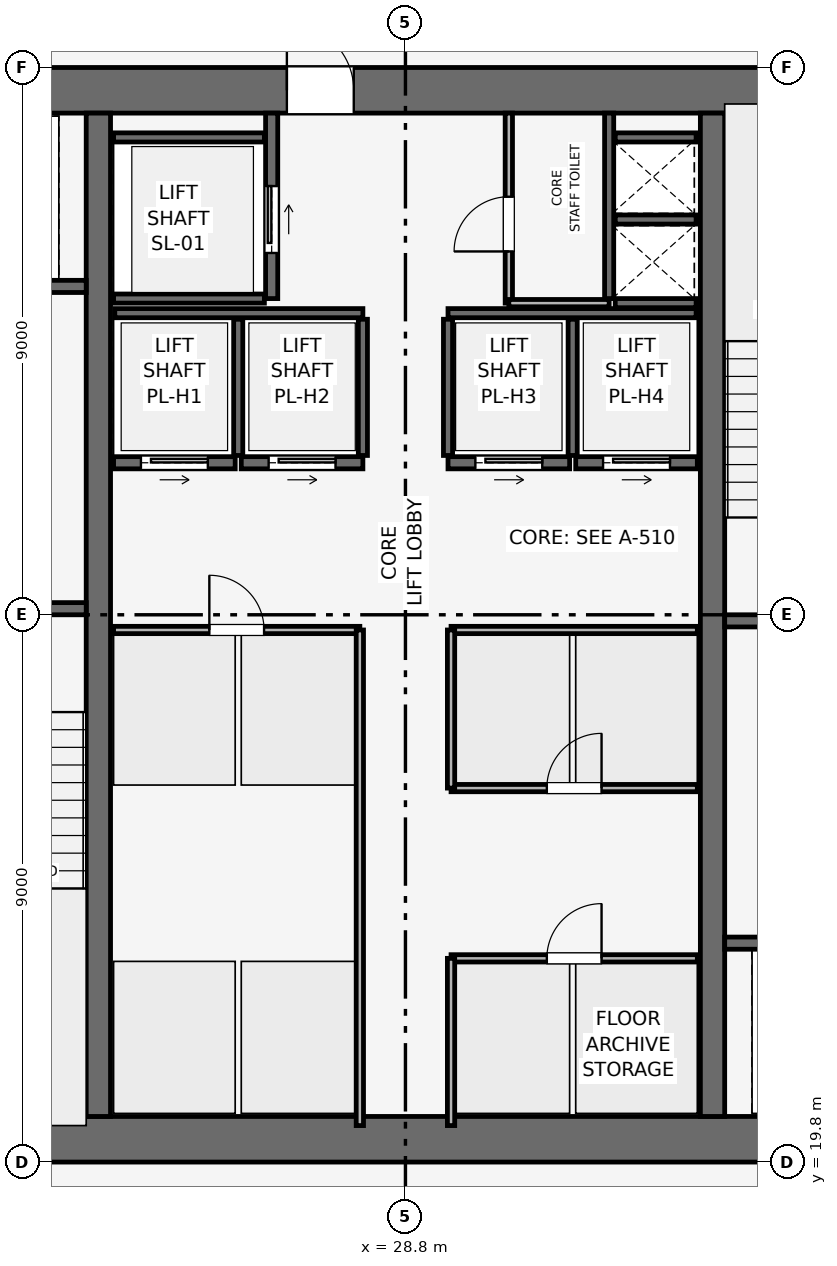
"""IFC4 building model, lengths in metres.
Left out: names, types, materials, properties, quantities, classifications, styles, units other than length and angle.
Written with IfcOpenShell. Run it as: python <this file> out.ifc"""

import sys

from ifc_helpers import new_model, si_unit, direction, frame, frame_2d, origin, place, context, subcontext, project, spatial, rectangle, extrude, element, fill, save


model = new_model("IFC4")
c1 = context("Model", 3, precision=1e-05, world=origin(), true_north=direction((0.0, 1.0)))
c2 = subcontext(c1, "Body", "Model", "MODEL_VIEW")
j1 = project(units=[si_unit("LENGTHUNIT", "METRE"), si_unit("PLANEANGLEUNIT", "RADIAN")], contexts=[c1])
p1 = place(None, origin())
s1 = spatial("IfcSite", under=j1, at=p1, CompositionType="ELEMENT")
p2 = place(p1, origin())
s2 = spatial("IfcBuilding", under=s1, at=p2, CompositionType="ELEMENT")
p3 = place(p2, frame((0.0, 0.0, 276.6)))
s3 = spatial("IfcBuildingStorey", under=s2, at=p3, CompositionType="ELEMENT", Elevation=276.6)
p4 = place(p3, frame((19.8, 20.175, 0.0), z_axis=(0.0, 0.0, 1.0), x_axis=(1.0, 0.0, 0.0)))
e1 = element("IfcWall", 1, at=p4, inside=s3, PredefinedType="SHEAR", context=c2, shape_type="SweptSolid", body=[
    extrude(rectangle(XDim=18.0, YDim=0.75, at=frame_2d((9.0, 0.0))), origin(), (0.0, 0.0, 1.0), 3.75),
])
p5 = place(p3, frame((19.8, 37.425, 0.0), z_axis=(0.0, 0.0, 1.0), x_axis=(1.0, 0.0, 0.0)))
e2 = element("IfcWall", 2, at=p5, inside=s3, PredefinedType="SHEAR", context=c2, shape_type="SweptSolid", body=[
    extrude(rectangle(XDim=18.0, YDim=0.75, at=frame_2d((9.0, 0.0))), origin(), (0.0, 0.0, 1.0), 3.75),
])
p6 = place(p5, frame((7.05, 0.0, 0.0)))
e3 = element("IfcOpeningElement", 3, at=p6, cuts=e2, PredefinedType="OPENING", context=c2, shape_type="SweptSolid", body=[
    extrude(rectangle(XDim=1.1, YDim=2.15, at=frame_2d((0.55, 1.075))), frame((0.0, 0.385, 0.0), z_axis=(0.0, -1.0, 0.0), x_axis=(1.0, 0.0, 0.0)), (0.0, 0.0, 1.0), 0.77),
])
for number, where, z_axis, x_axis in (
    (4, (23.75, 20.55, 0.0), (0.0, 0.0, 1.0), (0.0, 1.0, 0.0)),
    (5, (33.85, 20.55, 0.0), (0.0, 0.0, 1.0), (0.0, 1.0, 0.0)),
):
    element("IfcWall", number, at=place(p3, frame(where, z_axis=z_axis, x_axis=x_axis)), inside=s3, PredefinedType="SHEAR", context=c2, shape_type="SweptSolid", body=[
        extrude(rectangle(XDim=16.5, YDim=0.4, at=frame_2d((8.25, 0.0))), origin(), (0.0, 0.0, 1.0), 3.75),
    ])
p7 = place(p3, frame((20.4, 28.9, 0.0), z_axis=(0.0, 0.0, 1.0), x_axis=(1.0, 0.0, 0.0)))
e6 = element("IfcWall", 6, at=p7, inside=s3, PredefinedType="SHEAR", context=c2, shape_type="SweptSolid", body=[
    extrude(rectangle(XDim=3.15, YDim=0.2, at=frame_2d((1.575, 0.0))), origin(), (0.0, 0.0, 1.0), 3.5),
])
p8 = place(p7, frame((0.8, 0.0, 0.0)))
e7 = element("IfcOpeningElement", 7, at=p8, cuts=e6, PredefinedType="OPENING", context=c2, shape_type="SweptSolid", body=[
    extrude(rectangle(XDim=1.0, YDim=2.1, at=frame_2d((0.5, 1.05))), frame((0.0, 0.11, 0.0), z_axis=(0.0, -1.0, 0.0), x_axis=(1.0, 0.0, 0.0)), (0.0, 0.0, 1.0), 0.22),
])
p9 = place(p3, frame((34.05, 28.7, 0.0), z_axis=(0.0, 0.0, 1.0), x_axis=(1.0, 0.0, 0.0)))
e8 = element("IfcWall", 8, at=p9, inside=s3, PredefinedType="SHEAR", context=c2, shape_type="SweptSolid", body=[
    extrude(rectangle(XDim=3.15, YDim=0.2, at=frame_2d((1.575, 0.0))), origin(), (0.0, 0.0, 1.0), 3.5),
])
p10 = place(p9, frame((0.8, 0.0, 0.0)))
e9 = element("IfcOpeningElement", 9, at=p10, cuts=e8, PredefinedType="OPENING", context=c2, shape_type="SweptSolid", body=[
    extrude(rectangle(XDim=1.0, YDim=2.1, at=frame_2d((0.5, 1.05))), frame((0.0, 0.11, 0.0), z_axis=(0.0, -1.0, 0.0), x_axis=(1.0, 0.0, 0.0)), (0.0, 0.0, 1.0), 0.22),
])
p11 = place(p3, frame((32.15, 34.0, 0.0), z_axis=(0.0, 0.0, 1.0), x_axis=(0.0, 1.0, 0.0)))
e10 = element("IfcWall", 10, at=p11, inside=s3, PredefinedType="SHEAR", context=c2, shape_type="SweptSolid", body=[
    extrude(rectangle(XDim=3.05, YDim=0.15, at=frame_2d((1.525, 0.0))), origin(), (0.0, 0.0, 1.0), 3.5),
])
for number, where, z_axis, x_axis in (
    (11, (32.25, 33.925, 0.0), (0.0, 0.0, 1.0), (1.0, 0.0, 0.0)),
    (12, (32.25, 35.3, 0.0), (0.0, 0.0, 1.0), (1.0, 0.0, 0.0)),
):
    element("IfcWall", number, at=place(p3, frame(where, z_axis=z_axis, x_axis=x_axis)), inside=s3, PredefinedType="SHEAR", context=c2, shape_type="SweptSolid", body=[
        extrude(rectangle(XDim=1.33, YDim=0.15, at=frame_2d((0.665, 0.0))), origin(), (0.0, 0.0, 1.0), 3.5),
    ])
p12 = place(p3, frame((20.5, 34.2, 0.0), z_axis=(0.0, 0.0, 1.0), x_axis=(1.0, 0.0, 0.0)))
e13 = element("IfcWall", 13, at=p12, inside=s3, PredefinedType="SHEAR", context=c2, shape_type="SweptSolid", body=[
    extrude(rectangle(XDim=3.05, YDim=0.2, at=frame_2d((1.525, 0.0))), origin(), (0.0, 0.0, 1.0), 3.5),
])
p13 = place(p12, frame((0.75, 0.0, 0.0)))
e14 = element("IfcOpeningElement", 14, at=p13, cuts=e13, PredefinedType="OPENING", context=c2, shape_type="SweptSolid", body=[
    extrude(rectangle(XDim=1.1, YDim=2.15, at=frame_2d((0.55, 1.075))), frame((0.0, 0.11, 0.0), z_axis=(0.0, -1.0, 0.0), x_axis=(1.0, 0.0, 0.0)), (0.0, 0.0, 1.0), 0.22),
])
p14 = place(p3, frame((34.05, 23.4, 0.0), z_axis=(0.0, 0.0, 1.0), x_axis=(1.0, 0.0, 0.0)))
e15 = element("IfcWall", 15, at=p14, inside=s3, PredefinedType="SHEAR", context=c2, shape_type="SweptSolid", body=[
    extrude(rectangle(XDim=3.05, YDim=0.2, at=frame_2d((1.525, 0.0))), origin(), (0.0, 0.0, 1.0), 3.5),
])
p15 = place(p14, frame((1.2, 0.0, 0.0)))
e16 = element("IfcOpeningElement", 16, at=p15, cuts=e15, PredefinedType="OPENING", context=c2, shape_type="SweptSolid", body=[
    extrude(rectangle(XDim=1.1, YDim=2.15, at=frame_2d((0.55, 1.075))), frame((0.0, 0.11, 0.0), z_axis=(0.0, -1.0, 0.0), x_axis=(1.0, 0.0, 0.0)), (0.0, 0.0, 1.0), 0.22),
])
p16 = place(p3, frame((26.6, 34.0, 0.0), z_axis=(0.0, 0.0, 1.0), x_axis=(0.0, 1.0, 0.0)))
e17 = element("IfcWall", 17, at=p16, inside=s3, PredefinedType="SHEAR", context=c2, shape_type="SweptSolid", body=[
    extrude(rectangle(XDim=3.05, YDim=0.2, at=frame_2d((1.525, 0.0))), origin(), (0.0, 0.0, 1.0), 3.5),
])
p17 = place(p16, frame((0.75, 0.0, 0.0)))
e18 = element("IfcOpeningElement", 18, at=p17, cuts=e17, PredefinedType="OPENING", context=c2, shape_type="SweptSolid", body=[
    extrude(rectangle(XDim=1.1, YDim=2.15, at=frame_2d((0.55, 1.075))), frame((0.0, 0.11, 0.0), z_axis=(0.0, -1.0, 0.0), x_axis=(1.0, 0.0, 0.0)), (0.0, 0.0, 1.0), 0.22),
])
for number, where, z_axis, x_axis in (
    (19, (24.0, 34.0, 0.0), (0.0, 0.0, 1.0), (1.0, 0.0, 0.0)),
    (20, (24.0, 36.65, 0.0), (0.0, 0.0, 1.0), (1.0, 0.0, 0.0)),
):
    element("IfcWall", number, at=place(p3, frame(where, z_axis=z_axis, x_axis=x_axis)), inside=s3, PredefinedType="SHEAR", context=c2, shape_type="SweptSolid", body=[
        extrude(rectangle(XDim=2.48, YDim=0.15, at=frame_2d((1.24, 0.0))), origin(), (0.0, 0.0, 1.0), 3.5),
    ])
p18 = place(p3, frame((24.0, 31.3, 0.0), z_axis=(0.0, 0.0, 1.0), x_axis=(1.0, 0.0, 0.0)))
e21 = element("IfcWall", 21, at=p18, inside=s3, PredefinedType="SHEAR", context=c2, shape_type="SweptSolid", body=[
    extrude(rectangle(XDim=2.0, YDim=0.2, at=frame_2d((1.0, 0.0))), origin(), (0.0, 0.0, 1.0), 3.5),
])
p19 = place(p18, frame((0.45, 0.0, 0.0)))
e22 = element("IfcOpeningElement", 22, at=p19, cuts=e21, PredefinedType="OPENING", context=c2, shape_type="SweptSolid", body=[
    extrude(rectangle(XDim=1.1, YDim=2.15, at=frame_2d((0.55, 1.075))), frame((0.0, 0.11, 0.0), z_axis=(0.0, -1.0, 0.0), x_axis=(1.0, 0.0, 0.0)), (0.0, 0.0, 1.0), 0.22),
])
p20 = place(p3, frame((26.1, 31.3, 0.0), z_axis=(0.0, 0.0, 1.0), x_axis=(1.0, 0.0, 0.0)))
e23 = element("IfcWall", 23, at=p20, inside=s3, PredefinedType="SHEAR", context=c2, shape_type="SweptSolid", body=[
    extrude(rectangle(XDim=2.0, YDim=0.2, at=frame_2d((1.0, 0.0))), origin(), (0.0, 0.0, 1.0), 3.5),
])
p21 = place(p20, frame((0.45, 0.0, 0.0)))
e24 = element("IfcOpeningElement", 24, at=p21, cuts=e23, PredefinedType="OPENING", context=c2, shape_type="SweptSolid", body=[
    extrude(rectangle(XDim=1.1, YDim=2.15, at=frame_2d((0.55, 1.075))), frame((0.0, 0.11, 0.0), z_axis=(0.0, -1.0, 0.0), x_axis=(1.0, 0.0, 0.0)), (0.0, 0.0, 1.0), 0.22),
])
p22 = place(p3, frame((29.5, 31.3, 0.0), z_axis=(0.0, 0.0, 1.0), x_axis=(1.0, 0.0, 0.0)))
e25 = element("IfcWall", 25, at=p22, inside=s3, PredefinedType="SHEAR", context=c2, shape_type="SweptSolid", body=[
    extrude(rectangle(XDim=2.0, YDim=0.2, at=frame_2d((1.0, 0.0))), origin(), (0.0, 0.0, 1.0), 3.5),
])
p23 = place(p22, frame((0.45, 0.0, 0.0)))
e26 = element("IfcOpeningElement", 26, at=p23, cuts=e25, PredefinedType="OPENING", context=c2, shape_type="SweptSolid", body=[
    extrude(rectangle(XDim=1.1, YDim=2.15, at=frame_2d((0.55, 1.075))), frame((0.0, 0.11, 0.0), z_axis=(0.0, -1.0, 0.0), x_axis=(1.0, 0.0, 0.0)), (0.0, 0.0, 1.0), 0.22),
])
p24 = place(p3, frame((31.6, 31.3, 0.0), z_axis=(0.0, 0.0, 1.0), x_axis=(1.0, 0.0, 0.0)))
e27 = element("IfcWall", 27, at=p24, inside=s3, PredefinedType="SHEAR", context=c2, shape_type="SweptSolid", body=[
    extrude(rectangle(XDim=2.0, YDim=0.2, at=frame_2d((1.0, 0.0))), origin(), (0.0, 0.0, 1.0), 3.5),
])
p25 = place(p24, frame((0.45, 0.0, 0.0)))
e28 = element("IfcOpeningElement", 28, at=p25, cuts=e27, PredefinedType="OPENING", context=c2, shape_type="SweptSolid", body=[
    extrude(rectangle(XDim=1.1, YDim=2.15, at=frame_2d((0.55, 1.075))), frame((0.0, 0.11, 0.0), z_axis=(0.0, -1.0, 0.0), x_axis=(1.0, 0.0, 0.0)), (0.0, 0.0, 1.0), 0.22),
])
p26 = place(p3, frame((32.25, 36.65, 0.0), z_axis=(0.0, 0.0, 1.0), x_axis=(1.0, 0.0, 0.0)))
e29 = element("IfcWall", 29, at=p26, inside=s3, PredefinedType="SHEAR", context=c2, shape_type="SweptSolid", body=[
    extrude(rectangle(XDim=1.33, YDim=0.15, at=frame_2d((0.665, 0.0))), origin(), (0.0, 0.0, 1.0), 3.5),
])
for number, where, z_axis, x_axis in (
    (30, (24.02, 33.76, 0.0), (0.0, 0.0, 1.0), (1.0, 0.0, 0.0)),
    (31, (29.5, 33.76, 0.0), (0.0, 0.0, 1.0), (1.0, 0.0, 0.0)),
):
    element("IfcWall", number, at=place(p3, frame(where, z_axis=z_axis, x_axis=x_axis)), inside=s3, PredefinedType="SHEAR", context=c2, shape_type="SweptSolid", body=[
        extrude(rectangle(XDim=4.08, YDim=0.15, at=frame_2d((2.04, 0.0))), origin(), (0.0, 0.0, 1.0), 3.5),
    ])
for number, where, z_axis, x_axis in (
    (32, (26.05, 31.42, 0.0), (0.0, 0.0, 1.0), (0.0, 1.0, 0.0)),
    (33, (28.1, 31.42, 0.0), (0.0, 0.0, 1.0), (0.0, 1.0, 0.0)),
    (34, (29.5, 31.42, 0.0), (0.0, 0.0, 1.0), (0.0, 1.0, 0.0)),
    (35, (31.55, 31.42, 0.0), (0.0, 0.0, 1.0), (0.0, 1.0, 0.0)),
):
    element("IfcWall", number, at=place(p3, frame(where, z_axis=z_axis, x_axis=x_axis)), inside=s3, PredefinedType="SHEAR", context=c2, shape_type="SweptSolid", body=[
        extrude(rectangle(XDim=2.24, YDim=0.15, at=frame_2d((1.12, 0.0))), origin(), (0.0, 0.0, 1.0), 3.5),
    ])
p27 = place(p3, frame((30.5, 33.925, 0.0), z_axis=(0.0, 0.0, 1.0), x_axis=(0.0, 1.0, 0.0)))
e36 = element("IfcWall", 36, at=p27, inside=s3, PredefinedType="PARTITIONING", context=c2, shape_type="SweptSolid", body=[
    extrude(rectangle(XDim=3.125, YDim=0.12, at=frame_2d((1.562, 0.0))), origin(), (0.0, 0.0, 1.0), 3.5),
])
p28 = place(p27, frame((0.85, 0.0, 0.0)))
e37 = element("IfcOpeningElement", 37, at=p28, cuts=e36, PredefinedType="OPENING", context=c2, shape_type="SweptSolid", body=[
    extrude(rectangle(XDim=0.9, YDim=2.1, at=frame_2d((0.45, 1.05))), frame((0.0, 0.07, 0.0), z_axis=(0.0, -1.0, 0.0), x_axis=(1.0, 0.0, 0.0)), (0.0, 0.0, 1.0), 0.14),
])
p29 = place(p3, frame((30.5, 33.925, 0.0), z_axis=(0.0, 0.0, 1.0), x_axis=(1.0, 0.0, 0.0)))
e38 = element("IfcWall", 38, at=p29, inside=s3, PredefinedType="PARTITIONING", context=c2, shape_type="SweptSolid", body=[
    extrude(rectangle(XDim=1.65, YDim=0.12, at=frame_2d((0.825, 0.0))), origin(), (0.0, 0.0, 1.0), 3.5),
])
p30 = place(p3, frame((24.0, 28.55, 0.0), z_axis=(0.0, 0.0, 1.0), x_axis=(1.0, 0.0, 0.0)))
e39 = element("IfcWall", 39, at=p30, inside=s3, PredefinedType="PARTITIONING", context=c2, shape_type="SweptSolid", body=[
    extrude(rectangle(XDim=4.05, YDim=0.12, at=frame_2d((2.025, 0.0))), origin(), (0.0, 0.0, 1.0), 3.5),
])
p31 = place(p30, frame((1.575, 0.0, 0.0)))
e40 = element("IfcOpeningElement", 40, at=p31, cuts=e39, PredefinedType="OPENING", context=c2, shape_type="SweptSolid", body=[
    extrude(rectangle(XDim=0.9, YDim=2.1, at=frame_2d((0.45, 1.05))), frame((0.0, 0.07, 0.0), z_axis=(0.0, -1.0, 0.0), x_axis=(1.0, 0.0, 0.0)), (0.0, 0.0, 1.0), 0.14),
])
p32 = place(p3, frame((28.05, 20.4, 0.0), z_axis=(0.0, 0.0, 1.0), x_axis=(0.0, 1.0, 0.0)))
e41 = element("IfcWall", 41, at=p32, inside=s3, PredefinedType="PARTITIONING", context=c2, shape_type="SweptSolid", body=[
    extrude(rectangle(XDim=8.15, YDim=0.12, at=frame_2d((4.075, 0.0))), origin(), (0.0, 0.0, 1.0), 3.5),
])
p33 = place(p3, frame((29.55, 23.15, 0.0), z_axis=(0.0, 0.0, 1.0), x_axis=(1.0, 0.0, 0.0)))
e42 = element("IfcWall", 42, at=p33, inside=s3, PredefinedType="PARTITIONING", context=c2, shape_type="SweptSolid", body=[
    extrude(rectangle(XDim=4.05, YDim=0.12, at=frame_2d((2.025, 0.0))), origin(), (0.0, 0.0, 1.0), 3.5),
])
p34 = place(p33, frame((1.575, 0.0, 0.0)))
e43 = element("IfcOpeningElement", 43, at=p34, cuts=e42, PredefinedType="OPENING", context=c2, shape_type="SweptSolid", body=[
    extrude(rectangle(XDim=0.9, YDim=2.1, at=frame_2d((0.45, 1.05))), frame((0.0, 0.07, 0.0), z_axis=(0.0, -1.0, 0.0), x_axis=(1.0, 0.0, 0.0)), (0.0, 0.0, 1.0), 0.14),
])
p35 = place(p3, frame((29.55, 20.4, 0.0), z_axis=(0.0, 0.0, 1.0), x_axis=(0.0, 1.0, 0.0)))
e44 = element("IfcWall", 44, at=p35, inside=s3, PredefinedType="PARTITIONING", context=c2, shape_type="SweptSolid", body=[
    extrude(rectangle(XDim=2.75, YDim=0.12, at=frame_2d((1.375, 0.0))), origin(), (0.0, 0.0, 1.0), 3.5),
])
p36 = place(p3, frame((29.55, 25.95, 0.0), z_axis=(0.0, 0.0, 1.0), x_axis=(1.0, 0.0, 0.0)))
e45 = element("IfcWall", 45, at=p36, inside=s3, PredefinedType="PARTITIONING", context=c2, shape_type="SweptSolid", body=[
    extrude(rectangle(XDim=4.05, YDim=0.12, at=frame_2d((2.025, 0.0))), origin(), (0.0, 0.0, 1.0), 3.5),
])
p37 = place(p36, frame((1.575, 0.0, 0.0)))
e46 = element("IfcOpeningElement", 46, at=p37, cuts=e45, PredefinedType="OPENING", context=c2, shape_type="SweptSolid", body=[
    extrude(rectangle(XDim=0.9, YDim=2.1, at=frame_2d((0.45, 1.05))), frame((0.0, 0.07, 0.0), z_axis=(0.0, -1.0, 0.0), x_axis=(1.0, 0.0, 0.0)), (0.0, 0.0, 1.0), 0.14),
])
p38 = place(p3, frame((29.55, 28.55, 0.0), z_axis=(0.0, 0.0, 1.0), x_axis=(1.0, 0.0, 0.0)))
e47 = element("IfcWall", 47, at=p38, inside=s3, PredefinedType="PARTITIONING", context=c2, shape_type="SweptSolid", body=[
    extrude(rectangle(XDim=4.05, YDim=0.12, at=frame_2d((2.025, 0.0))), origin(), (0.0, 0.0, 1.0), 3.5),
])
p39 = place(p3, frame((29.55, 25.95, 0.0), z_axis=(0.0, 0.0, 1.0), x_axis=(0.0, 1.0, 0.0)))
e48 = element("IfcWall", 48, at=p39, inside=s3, PredefinedType="PARTITIONING", context=c2, shape_type="SweptSolid", body=[
    extrude(rectangle(XDim=2.6, YDim=0.12, at=frame_2d((1.3, 0.0))), origin(), (0.0, 0.0, 1.0), 3.5),
])
p40 = place(p17, origin())
e49 = element("IfcDoor", 49, at=p40, inside=s3, OperationType="SLIDING_TO_RIGHT", PredefinedType="DOOR", context=c2, shape_type="SweptSolid", body=[
    extrude(rectangle(XDim=1.1, YDim=2.15, at=frame_2d((0.55, 1.075))), frame((0.0, 0.025, 0.0), z_axis=(0.0, -1.0, 0.0), x_axis=(1.0, 0.0, 0.0)), (0.0, 0.0, 1.0), 0.05),
])
fill(e18, e49)
p41 = place(p19, origin())
e50 = element("IfcDoor", 50, at=p41, inside=s3, OperationType="SLIDING_TO_RIGHT", PredefinedType="DOOR", context=c2, shape_type="SweptSolid", body=[
    extrude(rectangle(XDim=1.1, YDim=2.15, at=frame_2d((0.55, 1.075))), frame((0.0, 0.025, 0.0), z_axis=(0.0, -1.0, 0.0), x_axis=(1.0, 0.0, 0.0)), (0.0, 0.0, 1.0), 0.05),
])
fill(e22, e50)
p42 = place(p21, origin())
e51 = element("IfcDoor", 51, at=p42, inside=s3, OperationType="SLIDING_TO_RIGHT", PredefinedType="DOOR", context=c2, shape_type="SweptSolid", body=[
    extrude(rectangle(XDim=1.1, YDim=2.15, at=frame_2d((0.55, 1.075))), frame((0.0, 0.025, 0.0), z_axis=(0.0, -1.0, 0.0), x_axis=(1.0, 0.0, 0.0)), (0.0, 0.0, 1.0), 0.05),
])
fill(e24, e51)
p43 = place(p23, origin())
e52 = element("IfcDoor", 52, at=p43, inside=s3, OperationType="SLIDING_TO_RIGHT", PredefinedType="DOOR", context=c2, shape_type="SweptSolid", body=[
    extrude(rectangle(XDim=1.1, YDim=2.15, at=frame_2d((0.55, 1.075))), frame((0.0, 0.025, 0.0), z_axis=(0.0, -1.0, 0.0), x_axis=(1.0, 0.0, 0.0)), (0.0, 0.0, 1.0), 0.05),
])
fill(e26, e52)
p44 = place(p25, origin())
e53 = element("IfcDoor", 53, at=p44, inside=s3, OperationType="SLIDING_TO_RIGHT", PredefinedType="DOOR", context=c2, shape_type="SweptSolid", body=[
    extrude(rectangle(XDim=1.1, YDim=2.15, at=frame_2d((0.55, 1.075))), frame((0.0, 0.025, 0.0), z_axis=(0.0, -1.0, 0.0), x_axis=(1.0, 0.0, 0.0)), (0.0, 0.0, 1.0), 0.05),
])
fill(e28, e53)
p45 = place(p28, origin())
e54 = element("IfcDoor", 54, at=p45, inside=s3, OperationType="SINGLE_SWING_LEFT", PredefinedType="DOOR", context=c2, shape_type="SweptSolid", body=[
    extrude(rectangle(XDim=0.9, YDim=2.1, at=frame_2d((0.45, 1.05))), frame((0.0, 0.025, 0.0), z_axis=(0.0, -1.0, 0.0), x_axis=(1.0, 0.0, 0.0)), (0.0, 0.0, 1.0), 0.05),
])
fill(e37, e54)
p46 = place(p31, origin())
e55 = element("IfcDoor", 55, at=p46, inside=s3, OperationType="SINGLE_SWING_LEFT", PredefinedType="DOOR", context=c2, shape_type="SweptSolid", body=[
    extrude(rectangle(XDim=0.9, YDim=2.1, at=frame_2d((0.45, 1.05))), frame((0.0, 0.025, 0.0), z_axis=(0.0, -1.0, 0.0), x_axis=(1.0, 0.0, 0.0)), (0.0, 0.0, 1.0), 0.05),
])
fill(e40, e55)
p47 = place(p34, origin())
e56 = element("IfcDoor", 56, at=p47, inside=s3, OperationType="SINGLE_SWING_RIGHT", PredefinedType="DOOR", context=c2, shape_type="SweptSolid", body=[
    extrude(rectangle(XDim=0.9, YDim=2.1, at=frame_2d((0.45, 1.05))), frame((0.0, 0.025, 0.0), z_axis=(0.0, -1.0, 0.0), x_axis=(1.0, 0.0, 0.0)), (0.0, 0.0, 1.0), 0.05),
])
fill(e43, e56)
p48 = place(p37, origin())
e57 = element("IfcDoor", 57, at=p48, inside=s3, OperationType="SINGLE_SWING_RIGHT", PredefinedType="DOOR", context=c2, shape_type="SweptSolid", body=[
    extrude(rectangle(XDim=0.9, YDim=2.1, at=frame_2d((0.45, 1.05))), frame((0.0, 0.025, 0.0), z_axis=(0.0, -1.0, 0.0), x_axis=(1.0, 0.0, 0.0)), (0.0, 0.0, 1.0), 0.05),
])
fill(e46, e57)
p49 = place(p6, origin())
e58 = element("IfcDoor", 58, at=p49, inside=s3, OperationType="SINGLE_SWING_LEFT", PredefinedType="DOOR", context=c2, shape_type="SweptSolid", body=[
    extrude(rectangle(XDim=1.1, YDim=2.15, at=frame_2d((0.55, 1.075))), frame((0.0, 0.025, 0.0), z_axis=(0.0, -1.0, 0.0), x_axis=(1.0, 0.0, 0.0)), (0.0, 0.0, 1.0), 0.05),
])
fill(e3, e58)
save(model, sys.argv[1])
